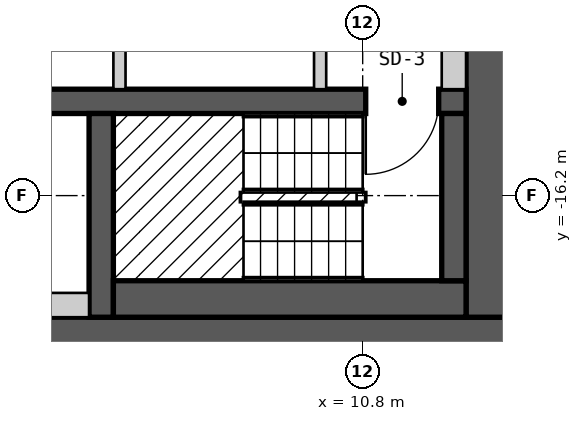
"""IFC4 building model, lengths in metres.
Left out: names, types, materials, properties, quantities, classifications, styles, units other than length and angle.
Written with IfcOpenShell. Run it as: python <this file> out.ifc"""

import sys

from ifc_helpers import new_model, si_unit, direction, frame, frame_2d, origin, place, context, subcontext, project, spatial, rectangle, extrude, element, fill, save


model = new_model("IFC4")
c1 = context("Model", 3, precision=1e-05, world=origin(), true_north=direction((0.0, 1.0)))
c2 = subcontext(c1, "Body", "Model", "MODEL_VIEW")
j1 = project(units=[si_unit("LENGTHUNIT", "METRE"), si_unit("PLANEANGLEUNIT", "RADIAN")], contexts=[c1])
p1 = place(None, origin())
s1 = spatial("IfcSite", under=j1, at=p1, CompositionType="ELEMENT")
p2 = place(p1, origin())
s2 = spatial("IfcBuilding", under=s1, at=p2, CompositionType="ELEMENT")
p3 = place(p2, frame((0.0, 0.0, 126.6)))
s3 = spatial("IfcBuildingStorey", under=s2, at=p3, CompositionType="ELEMENT", Elevation=126.6)
p4 = place(p3, frame((-13.3, -18.6, 0.0), z_axis=(0.0, 0.0, 1.0), x_axis=(1.0, 0.0, 0.0)))
e1 = element("IfcWall", 1, at=p4, inside=s3, PredefinedType="SHEAR", context=c2, shape_type="SweptSolid", body=[
    extrude(rectangle(XDim=26.6, YDim=0.8, at=frame_2d((13.3, 0.0))), origin(), (0.0, 0.0, 1.0), 2.7),
])
p5 = place(p3, frame((12.9, -18.2, 0.0), z_axis=(0.0, 0.0, 1.0), x_axis=(0.0, 1.0, 0.0)))
e2 = element("IfcWall", 2, at=p5, inside=s3, PredefinedType="SHEAR", context=c2, shape_type="SweptSolid", body=[
    extrude(rectangle(XDim=12.4, YDim=0.8, at=frame_2d((6.2, 0.0))), origin(), (0.0, 0.0, 1.0), 2.7),
])
p6 = place(p3, frame((-12.5, -14.65, 0.0), z_axis=(0.0, 0.0, 1.0), x_axis=(1.0, 0.0, 0.0)))
e3 = element("IfcWall", 3, at=p6, inside=s3, PredefinedType="SHEAR", context=c2, shape_type="SweptSolid", body=[
    extrude(rectangle(XDim=25.0, YDim=0.4, at=frame_2d((12.5, 0.0))), origin(), (0.0, 0.0, 1.0), 2.7),
])
p7 = place(p6, frame((1.7, 0.0, 0.0), z_axis=(0.0, 0.0, 1.0), x_axis=(-1.0, 0.0, 0.0)))
e4 = element("IfcOpeningElement", 4, at=p7, cuts=e3, PredefinedType="OPENING", context=c2, shape_type="SweptSolid", body=[
    extrude(rectangle(XDim=1.2, YDim=2.1, at=frame_2d((0.6, 1.05))), frame((0.0, 0.21, 0.0), z_axis=(0.0, -1.0, 0.0), x_axis=(1.0, 0.0, 0.0)), (0.0, 0.0, 1.0), 0.42),
])
p8 = place(p6, frame((24.55, 0.0, 0.0), z_axis=(0.0, 0.0, 1.0), x_axis=(-1.0, 0.0, 0.0)))
e5 = element("IfcOpeningElement", 5, at=p8, cuts=e3, PredefinedType="OPENING", context=c2, shape_type="SweptSolid", body=[
    extrude(rectangle(XDim=1.2, YDim=2.1, at=frame_2d((0.6, 1.05))), frame((0.0, 0.21, 0.0), z_axis=(0.0, -1.0, 0.0), x_axis=(1.0, 0.0, 0.0)), (0.0, 0.0, 1.0), 0.42),
])
p9 = place(p6, frame((8.4, 0.0, 0.0), z_axis=(0.0, 0.0, 1.0), x_axis=(-1.0, 0.0, 0.0)))
e6 = element("IfcOpeningElement", 6, at=p9, cuts=e3, PredefinedType="OPENING", context=c2, shape_type="SweptSolid", body=[
    extrude(rectangle(XDim=1.0, YDim=2.1, at=frame_2d((0.5, 1.05))), frame((0.0, 0.21, 0.0), z_axis=(0.0, -1.0, 0.0), x_axis=(1.0, 0.0, 0.0)), (0.0, 0.0, 1.0), 0.42),
])
p10 = place(p6, frame((11.15, 0.0, 0.0), z_axis=(0.0, 0.0, 1.0), x_axis=(-1.0, 0.0, 0.0)))
e7 = element("IfcOpeningElement", 7, at=p10, cuts=e3, PredefinedType="OPENING", context=c2, shape_type="SweptSolid", body=[
    extrude(rectangle(XDim=0.9, YDim=2.1, at=frame_2d((0.45, 1.05))), frame((0.0, 0.21, 0.0), z_axis=(0.0, -1.0, 0.0), x_axis=(1.0, 0.0, 0.0)), (0.0, 0.0, 1.0), 0.42),
])
p11 = place(p6, frame((13.95, 0.0, 0.0), z_axis=(0.0, 0.0, 1.0), x_axis=(-1.0, 0.0, 0.0)))
e8 = element("IfcOpeningElement", 8, at=p11, cuts=e3, PredefinedType="OPENING", context=c2, shape_type="SweptSolid", body=[
    extrude(rectangle(XDim=1.0, YDim=2.1, at=frame_2d((0.5, 1.05))), frame((0.0, 0.21, 0.0), z_axis=(0.0, -1.0, 0.0), x_axis=(1.0, 0.0, 0.0)), (0.0, 0.0, 1.0), 0.42),
])
p12 = place(p6, frame((17.55, 0.0, 0.0), z_axis=(0.0, 0.0, 1.0), x_axis=(-1.0, 0.0, 0.0)))
e9 = element("IfcOpeningElement", 9, at=p12, cuts=e3, PredefinedType="OPENING", context=c2, shape_type="SweptSolid", body=[
    extrude(rectangle(XDim=1.0, YDim=2.1, at=frame_2d((0.5, 1.05))), frame((0.0, 0.21, 0.0), z_axis=(0.0, -1.0, 0.0), x_axis=(1.0, 0.0, 0.0)), (0.0, 0.0, 1.0), 0.42),
])
p13 = place(p3, frame((6.5, -18.2, 0.0), z_axis=(0.0, 0.0, 1.0), x_axis=(0.0, 1.0, 0.0)))
e10 = element("IfcWall", 10, at=p13, inside=s3, PredefinedType="SHEAR", context=c2, shape_type="SweptSolid", body=[
    extrude(rectangle(XDim=3.35, YDim=0.4, at=frame_2d((1.675, 0.0))), origin(), (0.0, 0.0, 1.0), 2.7),
])
p14 = place(p3, frame((-6.3, -18.0, 0.0), z_axis=(0.0, 0.0, 1.0), x_axis=(1.0, 0.0, 0.0)))
e11 = element("IfcWall", 11, at=p14, inside=s3, PredefinedType="PARTITIONING", context=c2, shape_type="SweptSolid", body=[
    extrude(rectangle(XDim=12.6, YDim=0.4, at=frame_2d((6.3, 0.0))), origin(), (0.0, 0.0, 1.0), 2.7),
])
p15 = place(p3, frame((6.7, -17.9, 0.0), z_axis=(0.0, 0.0, 1.0), x_axis=(1.0, 0.0, 0.0)))
e12 = element("IfcWall", 12, at=p15, inside=s3, PredefinedType="SOLIDWALL", context=c2, shape_type="SweptSolid", body=[
    extrude(rectangle(XDim=5.8, YDim=0.6, at=frame_2d((2.9, 0.0))), origin(), (0.0, 0.0, 1.0), 2.7),
])
p16 = place(p3, frame((6.8, -14.45, 0.0), z_axis=(0.0, 0.0, 1.0), x_axis=(0.0, 1.0, 0.0)))
e13 = element("IfcWall", 13, at=p16, inside=s3, PredefinedType="PARTITIONING", context=c2, shape_type="SweptSolid", body=[
    extrude(rectangle(XDim=2.0, YDim=0.2, at=frame_2d((1.0, 0.0))), origin(), (0.0, 0.0, 1.0), 2.7),
])
p17 = place(p3, frame((10.1, -14.45, 0.0), z_axis=(0.0, 0.0, 1.0), x_axis=(0.0, 1.0, 0.0)))
e14 = element("IfcWall", 14, at=p17, inside=s3, PredefinedType="PARTITIONING", context=c2, shape_type="SweptSolid", body=[
    extrude(rectangle(XDim=1.8, YDim=0.2, at=frame_2d((0.9, 0.0))), origin(), (0.0, 0.0, 1.0), 2.7),
])
p18 = place(p3, frame((12.3, -17.6, 0.0), z_axis=(0.0, 0.0, 1.0), x_axis=(0.0, 1.0, 0.0)))
e15 = element("IfcWall", 15, at=p18, inside=s3, PredefinedType="SOLIDWALL", context=c2, shape_type="SweptSolid", body=[
    extrude(rectangle(XDim=2.75, YDim=0.4, at=frame_2d((1.375, 0.0))), origin(), (0.0, 0.0, 1.0), 2.7),
])
p19 = place(p3, frame((12.3, -14.45, 0.0), z_axis=(0.0, 0.0, 1.0), x_axis=(0.0, 1.0, 0.0)))
e16 = element("IfcWall", 16, at=p19, inside=s3, PredefinedType="PARTITIONING", context=c2, shape_type="SweptSolid", body=[
    extrude(rectangle(XDim=8.25, YDim=0.4, at=frame_2d((4.125, 0.0))), origin(), (0.0, 0.0, 1.0), 2.7),
])
p20 = place(p8, origin())
e17 = element("IfcDoor", 17, at=p20, inside=s3, OperationType="SINGLE_SWING_RIGHT", PredefinedType="DOOR", context=c2, shape_type="SweptSolid", body=[
    extrude(rectangle(XDim=1.2, YDim=2.1, at=frame_2d((0.6, 1.05))), frame((0.0, 0.025, 0.0), z_axis=(0.0, -1.0, 0.0), x_axis=(1.0, 0.0, 0.0)), (0.0, 0.0, 1.0), 0.05),
])
fill(e5, e17)
save(model, sys.argv[1])
